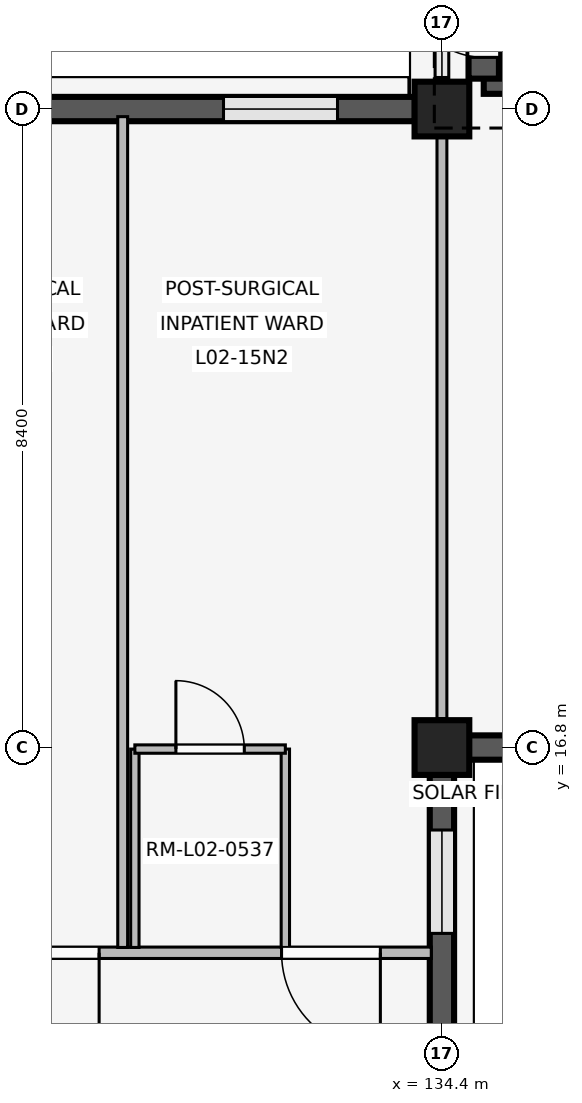
"""IFC4 building model, lengths in metres.
Left out: names, types, materials, properties, quantities, classifications, styles, units other than length and angle.
Written with IfcOpenShell. Run it as: python <this file> out.ifc"""

import sys

from ifc_helpers import new_model, si_unit, direction, frame, frame_2d, origin, origin_2d, place, context, subcontext, project, spatial, rectangle, extrude, element, fill, save


model = new_model("IFC4")
c1 = context("Model", 3, precision=1e-05, world=origin(), true_north=direction((0.0, 1.0)))
c2 = subcontext(c1, "Body", "Model", "MODEL_VIEW")
j1 = project(units=[si_unit("LENGTHUNIT", "METRE"), si_unit("PLANEANGLEUNIT", "RADIAN")], contexts=[c1])
p1 = place(None, origin())
s1 = spatial("IfcSite", under=j1, at=p1, CompositionType="ELEMENT")
p2 = place(p1, origin())
s2 = spatial("IfcBuilding", under=s1, at=p2, CompositionType="ELEMENT")
p3 = place(p2, frame((0.0, 0.0, 8.1)))
s3 = spatial("IfcBuildingStorey", under=s2, at=p3, CompositionType="ELEMENT", Elevation=8.1)
for number, where, z_axis, x_axis in (
    (1, (134.4, 16.8, 0.0), (0.0, 0.0, 1.0), (1.0, 0.0, 0.0)),
    (2, (134.4, 25.2, 0.0), (0.0, 0.0, 1.0), (1.0, 0.0, 0.0)),
):
    element("IfcColumn", number, at=place(p3, frame(where, z_axis=z_axis, x_axis=x_axis)), inside=s3, PredefinedType="COLUMN", context=c2, shape_type="SweptSolid", body=[
        extrude(rectangle(XDim=0.72, YDim=0.72, at=origin_2d()), origin(), (0.0, 0.0, 1.0), 4.8),
    ])
p4 = place(p3, frame((134.4, 16.445, 0.0), z_axis=(0.0, 0.0, 1.0), x_axis=(0.0, -1.0, 0.0)))
e3 = element("IfcWall", 3, at=p4, inside=s3, PredefinedType="SOLIDWALL", context=c2, shape_type="SweptSolid", body=[
    extrude(rectangle(XDim=7.69, YDim=0.32, at=frame_2d((3.845, 0.0))), origin(), (0.0, 0.0, 1.0), 3.86),
])
p5 = place(p4, frame((0.73, 0.0, 0.85)))
e4 = element("IfcOpeningElement", 4, at=p5, cuts=e3, PredefinedType="OPENING", context=c2, shape_type="SweptSolid", body=[
    extrude(rectangle(XDim=1.36, YDim=1.42, at=frame_2d((0.68, 0.71))), frame((0.0, 0.17, 0.0), z_axis=(0.0, -1.0, 0.0), x_axis=(1.0, 0.0, 0.0)), (0.0, 0.0, 1.0), 0.34),
])
p6 = place(p4, frame((5.6, 0.0, 0.85)))
e5 = element("IfcOpeningElement", 5, at=p6, cuts=e3, PredefinedType="OPENING", context=c2, shape_type="SweptSolid", body=[
    extrude(rectangle(XDim=1.36, YDim=1.42, at=frame_2d((0.68, 0.71))), frame((0.0, 0.17, 0.0), z_axis=(0.0, -1.0, 0.0), x_axis=(1.0, 0.0, 0.0)), (0.0, 0.0, 1.0), 0.34),
])
p7 = place(p3, frame((126.355, 25.2, 0.0), z_axis=(0.0, 0.0, 1.0), x_axis=(1.0, 0.0, 0.0)))
e6 = element("IfcWall", 6, at=p7, inside=s3, PredefinedType="SOLIDWALL", context=c2, shape_type="SweptSolid", body=[
    extrude(rectangle(XDim=7.69, YDim=0.32, at=frame_2d((3.845, 0.0))), origin(), (0.0, 0.0, 1.0), 3.86),
])
p8 = place(p7, frame((1.019, 0.0, 0.85)))
e7 = element("IfcOpeningElement", 7, at=p8, cuts=e6, PredefinedType="OPENING", context=c2, shape_type="SweptSolid", body=[
    extrude(rectangle(XDim=1.5, YDim=1.55, at=frame_2d((0.75, 0.775))), frame((0.0, 0.17, 0.0), z_axis=(0.0, -1.0, 0.0), x_axis=(1.0, 0.0, 0.0)), (0.0, 0.0, 1.0), 0.34),
])
p9 = place(p7, frame((5.171, 0.0, 0.85)))
e8 = element("IfcOpeningElement", 8, at=p9, cuts=e6, PredefinedType="OPENING", context=c2, shape_type="SweptSolid", body=[
    extrude(rectangle(XDim=1.5, YDim=1.55, at=frame_2d((0.75, 0.775))), frame((0.0, 0.17, 0.0), z_axis=(0.0, -1.0, 0.0), x_axis=(1.0, 0.0, 0.0)), (0.0, 0.0, 1.0), 0.34),
])
p10 = place(p3, frame((142.445, 16.8, 0.0), z_axis=(0.0, 0.0, 1.0), x_axis=(-1.0, 0.0, 0.0)))
e9 = element("IfcWall", 9, at=p10, inside=s3, PredefinedType="SOLIDWALL", context=c2, shape_type="SweptSolid", body=[
    extrude(rectangle(XDim=7.69, YDim=0.32, at=frame_2d((3.845, 0.0))), origin(), (0.0, 0.0, 1.0), 3.86),
])
p11 = place(p10, frame((1.149, 0.0, 0.85)))
e10 = element("IfcOpeningElement", 10, at=p11, cuts=e9, PredefinedType="OPENING", context=c2, shape_type="SweptSolid", body=[
    extrude(rectangle(XDim=1.24, YDim=1.34, at=frame_2d((0.62, 0.67))), frame((0.0, 0.17, 0.0), z_axis=(0.0, -1.0, 0.0), x_axis=(1.0, 0.0, 0.0)), (0.0, 0.0, 1.0), 0.34),
])
p12 = place(p10, frame((5.301, 0.0, 0.85)))
e11 = element("IfcOpeningElement", 11, at=p12, cuts=e9, PredefinedType="OPENING", context=c2, shape_type="SweptSolid", body=[
    extrude(rectangle(XDim=1.24, YDim=1.34, at=frame_2d((0.62, 0.67))), frame((0.0, 0.17, 0.0), z_axis=(0.0, -1.0, 0.0), x_axis=(1.0, 0.0, 0.0)), (0.0, 0.0, 1.0), 0.34),
])
p13 = place(p3, frame((134.95, 25.6, 0.0), z_axis=(0.0, 0.0, 1.0), x_axis=(1.0, 0.0, 0.0)))
e12 = element("IfcWall", 12, at=p13, inside=s3, PredefinedType="SHEAR", context=c2, shape_type="SweptSolid", body=[
    extrude(rectangle(XDim=7.5, YDim=0.4, at=frame_2d((3.75, 0.0))), origin(), (0.0, 0.0, 1.0), 4.52),
])
p14 = place(p13, frame((4.85, 0.0, 0.0)))
e13 = element("IfcOpeningElement", 13, at=p14, cuts=e12, PredefinedType="OPENING", context=c2, shape_type="SweptSolid", body=[
    extrude(rectangle(XDim=1.2, YDim=2.2, at=frame_2d((0.6, 1.1))), frame((0.0, 0.21, 0.0), z_axis=(0.0, -1.0, 0.0), x_axis=(1.0, 0.0, 0.0)), (0.0, 0.0, 1.0), 0.42),
])
p15 = place(p3, frame((134.95, 25.6, 0.0), z_axis=(0.0, 0.0, 1.0), x_axis=(0.0, 1.0, 0.0)))
e14 = element("IfcWall", 14, at=p15, inside=s3, PredefinedType="SHEAR", context=c2, shape_type="SweptSolid", body=[
    extrude(rectangle(XDim=7.55, YDim=0.4, at=frame_2d((3.775, 0.0))), origin(), (0.0, 0.0, 1.0), 4.52),
])
p16 = place(p15, frame((0.28, 0.0, 0.0)))
e15 = element("IfcOpeningElement", 15, at=p16, cuts=e14, PredefinedType="OPENING", context=c2, shape_type="SweptSolid", body=[
    extrude(rectangle(XDim=1.0, YDim=2.15, at=frame_2d((0.5, 1.075))), frame((0.0, 0.21, 0.0), z_axis=(0.0, -1.0, 0.0), x_axis=(1.0, 0.0, 0.0)), (0.0, 0.0, 1.0), 0.42),
])
p17 = place(p3, frame((134.4, 17.18, 0.0), z_axis=(0.0, 0.0, 1.0), x_axis=(0.0, 1.0, 0.0)))
e16 = element("IfcWall", 16, at=p17, inside=s3, PredefinedType="PARTITIONING", context=c2, shape_type="SweptSolid", body=[
    extrude(rectangle(XDim=7.88, YDim=0.13, at=frame_2d((3.94, 0.0))), origin(), (0.0, 0.0, 1.0), 3.84),
])
p18 = place(p3, frame((134.26, 14.1, 0.0), z_axis=(0.0, 0.0, 1.0), x_axis=(-1.0, 0.0, 0.0)))
e17 = element("IfcWall", 17, at=p18, inside=s3, PredefinedType="PARTITIONING", context=c2, shape_type="SweptSolid", body=[
    extrude(rectangle(XDim=8.18, YDim=0.15, at=frame_2d((4.09, 0.0))), origin(), (0.0, 0.0, 1.0), 3.84),
])
p19 = place(p18, frame((0.67, 0.0, 0.0)))
e18 = element("IfcOpeningElement", 18, at=p19, cuts=e17, PredefinedType="OPENING", context=c2, shape_type="SweptSolid", body=[
    extrude(rectangle(XDim=1.3, YDim=2.25, at=frame_2d((0.65, 1.125))), frame((0.0, 0.085, 0.0), z_axis=(0.0, -1.0, 0.0), x_axis=(1.0, 0.0, 0.0)), (0.0, 0.0, 1.0), 0.17),
])
p20 = place(p18, frame((4.37, 0.0, 0.0)))
e19 = element("IfcOpeningElement", 19, at=p20, cuts=e17, PredefinedType="OPENING", context=c2, shape_type="SweptSolid", body=[
    extrude(rectangle(XDim=1.3, YDim=2.25, at=frame_2d((0.65, 1.125))), frame((0.0, 0.085, 0.0), z_axis=(0.0, -1.0, 0.0), x_axis=(1.0, 0.0, 0.0)), (0.0, 0.0, 1.0), 0.17),
])
p21 = place(p3, frame((130.2, 14.17, 0.0), z_axis=(0.0, 0.0, 1.0), x_axis=(0.0, 1.0, 0.0)))
e20 = element("IfcWall", 20, at=p21, inside=s3, PredefinedType="PARTITIONING", context=c2, shape_type="SweptSolid", body=[
    extrude(rectangle(XDim=10.93, YDim=0.13, at=frame_2d((5.465, 0.0))), origin(), (0.0, 0.0, 1.0), 3.84),
])
for number, where, z_axis, x_axis in (
    (21, (130.36, 14.17, 0.0), (0.0, 0.0, 1.0), (0.0, 1.0, 0.0)),
    (22, (132.34, 14.17, 0.0), (0.0, 0.0, 1.0), (0.0, 1.0, 0.0)),
):
    element("IfcWall", number, at=place(p3, frame(where, z_axis=z_axis, x_axis=x_axis)), inside=s3, PredefinedType="PARTITIONING", context=c2, shape_type="SweptSolid", body=[
        extrude(rectangle(XDim=2.61, YDim=0.11, at=frame_2d((1.305, 0.0))), origin(), (0.0, 0.0, 1.0), 3.84),
    ])
p22 = place(p3, frame((130.36, 16.78, 0.0), z_axis=(0.0, 0.0, 1.0), x_axis=(1.0, 0.0, 0.0)))
e23 = element("IfcWall", 23, at=p22, inside=s3, PredefinedType="PARTITIONING", context=c2, shape_type="SweptSolid", body=[
    extrude(rectangle(XDim=1.98, YDim=0.11, at=frame_2d((0.99, 0.0))), origin(), (0.0, 0.0, 1.0), 3.84),
])
p23 = place(p22, frame((0.54, 0.0, 0.0)))
e24 = element("IfcOpeningElement", 24, at=p23, cuts=e23, PredefinedType="OPENING", context=c2, shape_type="SweptSolid", body=[
    extrude(rectangle(XDim=0.9, YDim=2.1, at=frame_2d((0.45, 1.05))), frame((0.0, 0.065, 0.0), z_axis=(0.0, -1.0, 0.0), x_axis=(1.0, 0.0, 0.0)), (0.0, 0.0, 1.0), 0.13),
])
p24 = place(p5, origin())
e25 = element("IfcWindow", 25, at=p24, inside=s3, PartitioningType="SINGLE_PANEL", PredefinedType="WINDOW", context=c2, shape_type="SweptSolid", body=[
    extrude(rectangle(XDim=1.36, YDim=1.42, at=frame_2d((0.68, 0.71))), frame((0.0, 0.03, 0.0), z_axis=(0.0, -1.0, 0.0), x_axis=(1.0, 0.0, 0.0)), (0.0, 0.0, 1.0), 0.06),
])
fill(e4, e25)
p25 = place(p9, origin())
e26 = element("IfcWindow", 26, at=p25, inside=s3, PartitioningType="SINGLE_PANEL", PredefinedType="WINDOW", context=c2, shape_type="SweptSolid", body=[
    extrude(rectangle(XDim=1.5, YDim=1.55, at=frame_2d((0.75, 0.775))), frame((0.0, 0.03, 0.0), z_axis=(0.0, -1.0, 0.0), x_axis=(1.0, 0.0, 0.0)), (0.0, 0.0, 1.0), 0.06),
])
fill(e8, e26)
p26 = place(p16, origin())
e27 = element("IfcDoor", 27, at=p26, inside=s3, OperationType="SINGLE_SWING_RIGHT", PredefinedType="DOOR", context=c2, shape_type="SweptSolid", body=[
    extrude(rectangle(XDim=1.0, YDim=2.15, at=frame_2d((0.5, 1.075))), frame((0.0, 0.025, 0.0), z_axis=(0.0, -1.0, 0.0), x_axis=(1.0, 0.0, 0.0)), (0.0, 0.0, 1.0), 0.05),
])
fill(e15, e27)
p27 = place(p19, origin())
e28 = element("IfcDoor", 28, at=p27, inside=s3, OperationType="SINGLE_SWING_LEFT", PredefinedType="DOOR", context=c2, shape_type="SweptSolid", body=[
    extrude(rectangle(XDim=1.3, YDim=2.25, at=frame_2d((0.65, 1.125))), frame((0.0, 0.025, 0.0), z_axis=(0.0, -1.0, 0.0), x_axis=(1.0, 0.0, 0.0)), (0.0, 0.0, 1.0), 0.05),
])
fill(e18, e28)
p28 = place(p20, origin())
e29 = element("IfcDoor", 29, at=p28, inside=s3, OperationType="SINGLE_SWING_LEFT", PredefinedType="DOOR", context=c2, shape_type="SweptSolid", body=[
    extrude(rectangle(XDim=1.3, YDim=2.25, at=frame_2d((0.65, 1.125))), frame((0.0, 0.025, 0.0), z_axis=(0.0, -1.0, 0.0), x_axis=(1.0, 0.0, 0.0)), (0.0, 0.0, 1.0), 0.05),
])
fill(e19, e29)
p29 = place(p23, origin())
e30 = element("IfcDoor", 30, at=p29, inside=s3, OperationType="SINGLE_SWING_LEFT", PredefinedType="DOOR", context=c2, shape_type="SweptSolid", body=[
    extrude(rectangle(XDim=0.9, YDim=2.1, at=frame_2d((0.45, 1.05))), frame((0.0, 0.025, 0.0), z_axis=(0.0, -1.0, 0.0), x_axis=(1.0, 0.0, 0.0)), (0.0, 0.0, 1.0), 0.05),
])
fill(e24, e30)
save(model, sys.argv[1])
